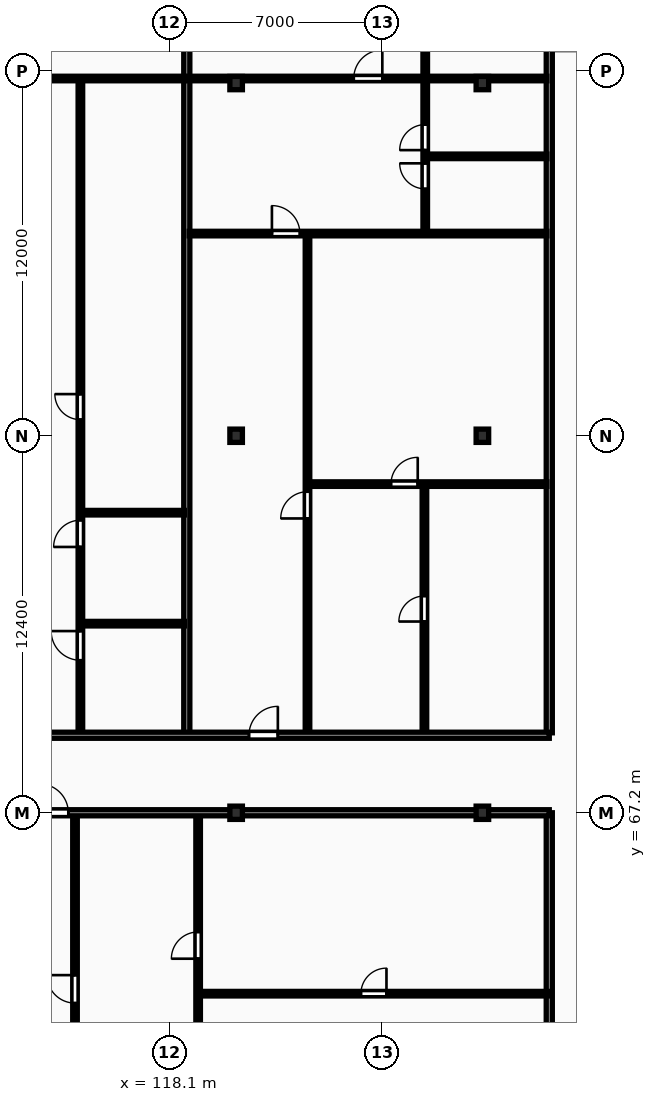
"""IFC4 building model, lengths in metres.
Left out: names, types, materials, properties, quantities, classifications, styles, units other than length and angle.
Written with IfcOpenShell. Run it as: python <this file> out.ifc"""

import sys

from ifc_helpers import new_model, si_unit, direction, frame, frame_2d, origin, origin_2d, place, context, subcontext, project, spatial, rectangle, i_section, extrude, element, fill, save


model = new_model("IFC4")
c1 = context("Model", 3, precision=1e-05, world=origin(), true_north=direction((0.0, 1.0)))
c2 = subcontext(c1, "Body", "Model", "MODEL_VIEW")
j1 = project(units=[si_unit("LENGTHUNIT", "METRE"), si_unit("PLANEANGLEUNIT", "RADIAN")], contexts=[c1])
p1 = place(None, origin())
s1 = spatial("IfcSite", under=j1, at=p1, CompositionType="ELEMENT")
p2 = place(p1, origin())
s2 = spatial("IfcBuilding", under=s1, at=p2, CompositionType="ELEMENT")
p3 = place(p2, frame((0.0, 0.0, 150.1)))
s3 = spatial("IfcBuildingStorey", under=s2, at=p3, CompositionType="ELEMENT", Elevation=150.1)
for number, where, z_axis, x_axis in (
    (1, (120.3, 67.2, 0.0), (0.0, 0.0, 1.0), (1.0, 0.0, 0.0)),
    (2, (120.3, 79.6, 0.0), (0.0, 0.0, 1.0), (1.0, 0.0, 0.0)),
    (3, (120.3, 91.2, 0.0), (0.0, 0.0, 1.0), (1.0, 0.0, 0.0)),
    (4, (128.4, 67.2, 0.0), (0.0, 0.0, 1.0), (1.0, 0.0, 0.0)),
    (5, (128.4, 79.6, 0.0), (0.0, 0.0, 1.0), (1.0, 0.0, 0.0)),
    (6, (128.4, 91.2, 0.0), (0.0, 0.0, 1.0), (1.0, 0.0, 0.0)),
):
    element("IfcColumn", number, at=place(p3, frame(where, z_axis=z_axis, x_axis=x_axis)), inside=s3, PredefinedType="COLUMN", context=c2, shape_type="SweptSolid", body=[
        extrude(i_section(OverallWidth=0.412, OverallDepth=0.437, WebThickness=0.036, FlangeThickness=0.052, FilletRadius=0.015, at=origin_2d()), origin(), (0.0, 0.0, 1.0), 3.6),
    ])
p4 = place(p3, frame((130.6, 51.1, 0.0), z_axis=(0.0, 0.0, 1.0), x_axis=(0.0, 1.0, 0.0)))
e7 = element("IfcWall", 7, at=p4, inside=s3, PredefinedType="PARTITIONING", context=c2, shape_type="SweptSolid", body=[
    extrude(rectangle(XDim=16.1, YDim=0.2, at=frame_2d((8.05, 0.0))), origin(), (0.0, 0.0, 1.0), 3.31),
])
p5 = place(p3, frame((119.05, 61.25, 0.0), z_axis=(0.0, 0.0, 1.0), x_axis=(1.0, 0.0, 0.0)))
e8 = element("IfcWall", 8, at=p5, inside=s3, PredefinedType="PARTITIONING", context=c2, shape_type="SweptSolid", body=[
    extrude(rectangle(XDim=11.55, YDim=0.15, at=frame_2d((5.775, 0.0))), origin(), (0.0, 0.0, 1.0), 3.31),
])
p6 = place(p5, frame((5.355, 0.0, 0.0)))
e9 = element("IfcOpeningElement", 9, at=p6, cuts=e8, PredefinedType="OPENING", context=c2, shape_type="SweptSolid", body=[
    extrude(rectangle(XDim=0.84, YDim=2.04, at=frame_2d((0.42, 1.02))), frame((0.0, 0.085, 0.0), z_axis=(0.0, -1.0, 0.0), x_axis=(1.0, 0.0, 0.0)), (0.0, 0.0, 1.0), 0.17),
])
p7 = place(p3, frame((119.05, 51.1, 0.0), z_axis=(0.0, 0.0, 1.0), x_axis=(0.0, 1.0, 0.0)))
e10 = element("IfcWall", 10, at=p7, inside=s3, PredefinedType="PARTITIONING", context=c2, shape_type="SweptSolid", body=[
    extrude(rectangle(XDim=16.05, YDim=0.15, at=frame_2d((8.025, 0.0))), origin(), (0.0, 0.0, 1.0), 3.31),
])
p8 = place(p7, frame((11.3, 0.0, 0.0)))
e11 = element("IfcOpeningElement", 11, at=p8, cuts=e10, PredefinedType="OPENING", context=c2, shape_type="SweptSolid", body=[
    extrude(rectangle(XDim=0.88, YDim=2.06, at=frame_2d((0.44, 1.03))), frame((0.0, 0.085, 0.0), z_axis=(0.0, -1.0, 0.0), x_axis=(1.0, 0.0, 0.0)), (0.0, 0.0, 1.0), 0.17),
])
p9 = place(p3, frame((115.0, 55.65, 0.0), z_axis=(0.0, 0.0, 1.0), x_axis=(0.0, 1.0, 0.0)))
e12 = element("IfcWall", 12, at=p9, inside=s3, PredefinedType="PARTITIONING", context=c2, shape_type="SweptSolid", body=[
    extrude(rectangle(XDim=11.5, YDim=0.15, at=frame_2d((5.75, 0.0))), origin(), (0.0, 0.0, 1.0), 3.31),
])
p10 = place(p9, frame((5.29, 0.0, 0.0)))
e13 = element("IfcOpeningElement", 13, at=p10, cuts=e12, PredefinedType="OPENING", context=c2, shape_type="SweptSolid", body=[
    extrude(rectangle(XDim=0.92, YDim=2.08, at=frame_2d((0.46, 1.04))), frame((0.0, 0.085, 0.0), z_axis=(0.0, -1.0, 0.0), x_axis=(1.0, 0.0, 0.0)), (0.0, 0.0, 1.0), 0.17),
])
p11 = place(p3, frame((112.25, 67.2, 0.0), z_axis=(0.0, 0.0, 1.0), x_axis=(1.0, 0.0, 0.0)))
e14 = element("IfcWall", 14, at=p11, inside=s3, PredefinedType="PARTITIONING", context=c2, shape_type="SweptSolid", body=[
    extrude(rectangle(XDim=18.35, YDim=0.2, at=frame_2d((9.175, 0.0))), origin(), (0.0, 0.0, 1.0), 2.773),
])
p12 = place(p11, frame((1.58, 0.0, 0.0)))
e15 = element("IfcOpeningElement", 15, at=p12, cuts=e14, PredefinedType="OPENING", context=c2, shape_type="SweptSolid", body=[
    extrude(rectangle(XDim=0.95, YDim=2.15, at=frame_2d((0.475, 1.075))), frame((0.0, 0.11, 0.0), z_axis=(0.0, -1.0, 0.0), x_axis=(1.0, 0.0, 0.0)), (0.0, 0.0, 1.0), 0.22),
])
for number, where, z_axis, x_axis in (
    (16, (130.6, 69.83, 0.0), (0.0, 0.0, 1.0), (0.0, 1.0, 0.0)),
    (17, (118.677, 69.83, 0.0), (0.0, 0.0, 1.0), (0.0, 1.0, 0.0)),
):
    element("IfcWall", number, at=place(p3, frame(where, z_axis=z_axis, x_axis=x_axis)), inside=s3, PredefinedType="PARTITIONING", context=c2, shape_type="SweptSolid", body=[
        extrude(rectangle(XDim=26.07, YDim=0.2, at=frame_2d((13.035, 0.0))), origin(), (0.0, 0.0, 1.0), 3.31),
    ])
for number, where, z_axis, x_axis in (
    (18, (115.237, 73.42, 0.0), (0.0, 0.0, 1.0), (1.0, 0.0, 0.0)),
    (19, (115.237, 77.07, 0.0), (0.0, 0.0, 1.0), (1.0, 0.0, 0.0)),
):
    element("IfcWall", number, at=place(p3, frame(where, z_axis=z_axis, x_axis=x_axis)), inside=s3, PredefinedType="PARTITIONING", context=c2, shape_type="SweptSolid", body=[
        extrude(rectangle(XDim=3.36, YDim=0.15, at=frame_2d((1.68, 0.0))), origin(), (0.0, 0.0, 1.0), 3.31),
    ])
p13 = place(p3, frame((115.177, 69.81, 0.0), z_axis=(0.0, 0.0, 1.0), x_axis=(0.0, 1.0, 0.0)))
e20 = element("IfcWall", 20, at=p13, inside=s3, PredefinedType="PARTITIONING", context=c2, shape_type="SweptSolid", body=[
    extrude(rectangle(XDim=21.48, YDim=0.15, at=frame_2d((10.74, 0.0))), origin(), (0.0, 0.0, 1.0), 3.31),
])
p14 = place(p13, frame((2.406, 0.0, 0.0)))
e21 = element("IfcOpeningElement", 21, at=p14, cuts=e20, PredefinedType="OPENING", context=c2, shape_type="SweptSolid", body=[
    extrude(rectangle(XDim=0.96, YDim=2.1, at=frame_2d((0.48, 1.05))), frame((0.0, 0.085, 0.0), z_axis=(0.0, -1.0, 0.0), x_axis=(1.0, 0.0, 0.0)), (0.0, 0.0, 1.0), 0.17),
])
p15 = place(p13, frame((6.133, 0.0, 0.0)))
e22 = element("IfcOpeningElement", 22, at=p15, cuts=e20, PredefinedType="OPENING", context=c2, shape_type="SweptSolid", body=[
    extrude(rectangle(XDim=0.88, YDim=2.06, at=frame_2d((0.44, 1.03))), frame((0.0, 0.085, 0.0), z_axis=(0.0, -1.0, 0.0), x_axis=(1.0, 0.0, 0.0)), (0.0, 0.0, 1.0), 0.17),
])
p16 = place(p13, frame((10.32, 0.0, 0.0)))
e23 = element("IfcOpeningElement", 23, at=p16, cuts=e20, PredefinedType="OPENING", context=c2, shape_type="SweptSolid", body=[
    extrude(rectangle(XDim=0.84, YDim=2.04, at=frame_2d((0.42, 1.02))), frame((0.0, 0.085, 0.0), z_axis=(0.0, -1.0, 0.0), x_axis=(1.0, 0.0, 0.0)), (0.0, 0.0, 1.0), 0.17),
])
p17 = place(p3, frame((98.896, 91.35, 0.0), z_axis=(0.0, 0.0, 1.0), x_axis=(1.0, 0.0, 0.0)))
e24 = element("IfcWall", 24, at=p17, inside=s3, PredefinedType="PARTITIONING", context=c2, shape_type="SweptSolid", body=[
    extrude(rectangle(XDim=19.701, YDim=0.15, at=frame_2d((9.851, 0.0))), origin(), (0.0, 0.0, 1.0), 3.003),
])
p18 = place(p17, frame((7.24, 0.0, 0.0)))
e25 = element("IfcOpeningElement", 25, at=p18, cuts=e24, PredefinedType="OPENING", context=c2, shape_type="SweptSolid", body=[
    extrude(rectangle(XDim=0.94, YDim=2.1, at=frame_2d((0.47, 1.05))), frame((0.0, 0.085, 0.0), z_axis=(0.0, -1.0, 0.0), x_axis=(1.0, 0.0, 0.0)), (0.0, 0.0, 1.0), 0.17),
])
p19 = place(p17, frame((9.381, 0.0, 0.0)))
e26 = element("IfcOpeningElement", 26, at=p19, cuts=e24, PredefinedType="OPENING", context=c2, shape_type="SweptSolid", body=[
    extrude(rectangle(XDim=0.94, YDim=2.1, at=frame_2d((0.47, 1.05))), frame((0.0, 0.085, 0.0), z_axis=(0.0, -1.0, 0.0), x_axis=(1.0, 0.0, 0.0)), (0.0, 0.0, 1.0), 0.17),
])
p20 = place(p3, frame((126.494, 69.81, 0.0), z_axis=(0.0, 0.0, 1.0), x_axis=(0.0, 1.0, 0.0)))
e27 = element("IfcWall", 27, at=p20, inside=s3, PredefinedType="PARTITIONING", context=c2, shape_type="SweptSolid", body=[
    extrude(rectangle(XDim=8.2, YDim=0.15, at=frame_2d((4.1, 0.0))), origin(), (0.0, 0.0, 1.0), 3.31),
])
p21 = place(p20, frame((3.68, 0.0, 0.0)))
e28 = element("IfcOpeningElement", 28, at=p21, cuts=e27, PredefinedType="OPENING", context=c2, shape_type="SweptSolid", body=[
    extrude(rectangle(XDim=0.84, YDim=2.04, at=frame_2d((0.42, 1.02))), frame((0.0, 0.085, 0.0), z_axis=(0.0, -1.0, 0.0), x_axis=(1.0, 0.0, 0.0)), (0.0, 0.0, 1.0), 0.17),
])
p22 = place(p3, frame((122.707, 78.01, 0.0), z_axis=(0.0, 0.0, 1.0), x_axis=(1.0, 0.0, 0.0)))
e29 = element("IfcWall", 29, at=p22, inside=s3, PredefinedType="PARTITIONING", context=c2, shape_type="SweptSolid", body=[
    extrude(rectangle(XDim=7.813, YDim=0.15, at=frame_2d((3.906, 0.0))), origin(), (0.0, 0.0, 1.0), 3.31),
])
p23 = place(p22, frame((2.686, 0.0, 0.0)))
e30 = element("IfcOpeningElement", 30, at=p23, cuts=e29, PredefinedType="OPENING", context=c2, shape_type="SweptSolid", body=[
    extrude(rectangle(XDim=0.88, YDim=2.06, at=frame_2d((0.44, 1.03))), frame((0.0, 0.085, 0.0), z_axis=(0.0, -1.0, 0.0), x_axis=(1.0, 0.0, 0.0)), (0.0, 0.0, 1.0), 0.17),
])
p24 = place(p3, frame((122.647, 69.81, 0.0), z_axis=(0.0, 0.0, 1.0), x_axis=(0.0, 1.0, 0.0)))
e31 = element("IfcWall", 31, at=p24, inside=s3, PredefinedType="PARTITIONING", context=c2, shape_type="SweptSolid", body=[
    extrude(rectangle(XDim=16.4, YDim=0.15, at=frame_2d((8.2, 0.0))), origin(), (0.0, 0.0, 1.0), 3.31),
])
p25 = place(p24, frame((7.07, 0.0, 0.0)))
e32 = element("IfcOpeningElement", 32, at=p25, cuts=e31, PredefinedType="OPENING", context=c2, shape_type="SweptSolid", body=[
    extrude(rectangle(XDim=0.88, YDim=2.06, at=frame_2d((0.44, 1.03))), frame((0.0, 0.085, 0.0), z_axis=(0.0, -1.0, 0.0), x_axis=(1.0, 0.0, 0.0)), (0.0, 0.0, 1.0), 0.17),
])
p26 = place(p3, frame((126.58, 88.79, 0.0), z_axis=(0.0, 0.0, 1.0), x_axis=(1.0, 0.0, 0.0)))
e33 = element("IfcWall", 33, at=p26, inside=s3, PredefinedType="PARTITIONING", context=c2, shape_type="SweptSolid", body=[
    extrude(rectangle(XDim=3.94, YDim=0.15, at=frame_2d((1.97, 0.0))), origin(), (0.0, 0.0, 1.0), 3.31),
])
p27 = place(p3, frame((126.52, 86.29, 0.0), z_axis=(0.0, 0.0, 1.0), x_axis=(0.0, 1.0, 0.0)))
e34 = element("IfcWall", 34, at=p27, inside=s3, PredefinedType="PARTITIONING", context=c2, shape_type="SweptSolid", body=[
    extrude(rectangle(XDim=9.61, YDim=0.15, at=frame_2d((4.805, 0.0))), origin(), (0.0, 0.0, 1.0), 3.31),
])
p28 = place(p27, frame((1.43, 0.0, 0.0)))
e35 = element("IfcOpeningElement", 35, at=p28, cuts=e34, PredefinedType="OPENING", context=c2, shape_type="SweptSolid", body=[
    extrude(rectangle(XDim=0.84, YDim=2.04, at=frame_2d((0.42, 1.02))), frame((0.0, 0.085, 0.0), z_axis=(0.0, -1.0, 0.0), x_axis=(1.0, 0.0, 0.0)), (0.0, 0.0, 1.0), 0.17),
])
p29 = place(p27, frame((2.705, 0.0, 0.0)))
e36 = element("IfcOpeningElement", 36, at=p29, cuts=e34, PredefinedType="OPENING", context=c2, shape_type="SweptSolid", body=[
    extrude(rectangle(XDim=0.84, YDim=2.04, at=frame_2d((0.42, 1.02))), frame((0.0, 0.085, 0.0), z_axis=(0.0, -1.0, 0.0), x_axis=(1.0, 0.0, 0.0)), (0.0, 0.0, 1.0), 0.17),
])
p30 = place(p27, frame((6.314, 0.0, 0.0)))
e37 = element("IfcOpeningElement", 37, at=p30, cuts=e34, PredefinedType="OPENING", context=c2, shape_type="SweptSolid", body=[
    extrude(rectangle(XDim=0.88, YDim=2.06, at=frame_2d((0.44, 1.03))), frame((0.0, 0.085, 0.0), z_axis=(0.0, -1.0, 0.0), x_axis=(1.0, 0.0, 0.0)), (0.0, 0.0, 1.0), 0.17),
])
p31 = place(p3, frame((118.757, 86.25, 0.0), z_axis=(0.0, 0.0, 1.0), x_axis=(1.0, 0.0, 0.0)))
e38 = element("IfcWall", 38, at=p31, inside=s3, PredefinedType="PARTITIONING", context=c2, shape_type="SweptSolid", body=[
    extrude(rectangle(XDim=11.763, YDim=0.15, at=frame_2d((5.881, 0.0))), origin(), (0.0, 0.0, 1.0), 3.31),
])
p32 = place(p31, frame((2.72, 0.0, 0.0)))
e39 = element("IfcOpeningElement", 39, at=p32, cuts=e38, PredefinedType="OPENING", context=c2, shape_type="SweptSolid", body=[
    extrude(rectangle(XDim=0.92, YDim=2.08, at=frame_2d((0.46, 1.04))), frame((0.0, 0.085, 0.0), z_axis=(0.0, -1.0, 0.0), x_axis=(1.0, 0.0, 0.0)), (0.0, 0.0, 1.0), 0.17),
])
p33 = place(p3, frame((118.757, 91.35, 0.0), z_axis=(0.0, 0.0, 1.0), x_axis=(1.0, 0.0, 0.0)))
e40 = element("IfcWall", 40, at=p33, inside=s3, PredefinedType="PARTITIONING", context=c2, shape_type="SweptSolid", body=[
    extrude(rectangle(XDim=11.763, YDim=0.15, at=frame_2d((5.881, 0.0))), origin(), (0.0, 0.0, 1.0), 3.003),
])
p34 = place(p33, frame((5.411, 0.0, 0.0)))
e41 = element("IfcOpeningElement", 41, at=p34, cuts=e40, PredefinedType="OPENING", context=c2, shape_type="SweptSolid", body=[
    extrude(rectangle(XDim=0.94, YDim=2.1, at=frame_2d((0.47, 1.05))), frame((0.0, 0.085, 0.0), z_axis=(0.0, -1.0, 0.0), x_axis=(1.0, 0.0, 0.0)), (0.0, 0.0, 1.0), 0.17),
])
p35 = place(p3, frame((57.6, 69.75, 0.0), z_axis=(0.0, 0.0, 1.0), x_axis=(1.0, 0.0, 0.0)))
e42 = element("IfcWall", 42, at=p35, inside=s3, PredefinedType="PARTITIONING", context=c2, shape_type="SweptSolid", body=[
    extrude(rectangle(XDim=73.0, YDim=0.2, at=frame_2d((36.5, 0.0))), origin(), (0.0, 0.0, 1.0), 3.31),
])
p36 = place(p35, frame((9.189, 0.0, 0.0)))
e43 = element("IfcOpeningElement", 43, at=p36, cuts=e42, PredefinedType="OPENING", context=c2, shape_type="SweptSolid", body=[
    extrude(rectangle(XDim=1.22, YDim=2.18, at=frame_2d((0.61, 1.09))), frame((0.0, 0.11, 0.0), z_axis=(0.0, -1.0, 0.0), x_axis=(1.0, 0.0, 0.0)), (0.0, 0.0, 1.0), 0.22),
])
p37 = place(p35, frame((29.912, 0.0, 0.0)))
e44 = element("IfcOpeningElement", 44, at=p37, cuts=e42, PredefinedType="OPENING", context=c2, shape_type="SweptSolid", body=[
    extrude(rectangle(XDim=1.22, YDim=2.18, at=frame_2d((0.61, 1.09))), frame((0.0, 0.11, 0.0), z_axis=(0.0, -1.0, 0.0), x_axis=(1.0, 0.0, 0.0)), (0.0, 0.0, 1.0), 0.22),
])
p38 = place(p35, frame((49.457, 0.0, 0.0)))
e45 = element("IfcOpeningElement", 45, at=p38, cuts=e42, PredefinedType="OPENING", context=c2, shape_type="SweptSolid", body=[
    extrude(rectangle(XDim=1.22, YDim=2.18, at=frame_2d((0.61, 1.09))), frame((0.0, 0.11, 0.0), z_axis=(0.0, -1.0, 0.0), x_axis=(1.0, 0.0, 0.0)), (0.0, 0.0, 1.0), 0.22),
])
p39 = place(p35, frame((63.122, 0.0, 0.0)))
e46 = element("IfcOpeningElement", 46, at=p39, cuts=e42, PredefinedType="OPENING", context=c2, shape_type="SweptSolid", body=[
    extrude(rectangle(XDim=0.95, YDim=2.15, at=frame_2d((0.475, 1.075))), frame((0.0, 0.11, 0.0), z_axis=(0.0, -1.0, 0.0), x_axis=(1.0, 0.0, 0.0)), (0.0, 0.0, 1.0), 0.22),
])
p40 = place(p6, origin())
e47 = element("IfcDoor", 47, at=p40, inside=s3, OperationType="SINGLE_SWING_RIGHT", PredefinedType="DOOR", context=c2, shape_type="SweptSolid", body=[
    extrude(rectangle(XDim=0.84, YDim=2.04, at=frame_2d((0.42, 1.02))), frame((0.0, 0.025, 0.0), z_axis=(0.0, -1.0, 0.0), x_axis=(1.0, 0.0, 0.0)), (0.0, 0.0, 1.0), 0.05),
])
fill(e9, e47)
p41 = place(p8, origin())
e48 = element("IfcDoor", 48, at=p41, inside=s3, OperationType="SINGLE_SWING_LEFT", PredefinedType="DOOR", context=c2, shape_type="SweptSolid", body=[
    extrude(rectangle(XDim=0.88, YDim=2.06, at=frame_2d((0.44, 1.03))), frame((0.0, 0.025, 0.0), z_axis=(0.0, -1.0, 0.0), x_axis=(1.0, 0.0, 0.0)), (0.0, 0.0, 1.0), 0.05),
])
fill(e11, e48)
p42 = place(p10, origin())
e49 = element("IfcDoor", 49, at=p42, inside=s3, OperationType="SINGLE_SWING_RIGHT", PredefinedType="DOOR", context=c2, shape_type="SweptSolid", body=[
    extrude(rectangle(XDim=0.92, YDim=2.08, at=frame_2d((0.46, 1.04))), frame((0.0, 0.025, 0.0), z_axis=(0.0, -1.0, 0.0), x_axis=(1.0, 0.0, 0.0)), (0.0, 0.0, 1.0), 0.05),
])
fill(e13, e49)
p43 = place(p12, origin())
e50 = element("IfcDoor", 50, at=p43, inside=s3, OperationType="SINGLE_SWING_LEFT", PredefinedType="DOOR", context=c2, shape_type="SweptSolid", body=[
    extrude(rectangle(XDim=0.95, YDim=2.15, at=frame_2d((0.475, 1.075))), frame((0.0, 0.025, 0.0), z_axis=(0.0, -1.0, 0.0), x_axis=(1.0, 0.0, 0.0)), (0.0, 0.0, 1.0), 0.05),
])
fill(e15, e50)
p44 = place(p14, origin())
e51 = element("IfcDoor", 51, at=p44, inside=s3, OperationType="SINGLE_SWING_RIGHT", PredefinedType="DOOR", context=c2, shape_type="SweptSolid", body=[
    extrude(rectangle(XDim=0.96, YDim=2.1, at=frame_2d((0.48, 1.05))), frame((0.0, 0.025, 0.0), z_axis=(0.0, -1.0, 0.0), x_axis=(1.0, 0.0, 0.0)), (0.0, 0.0, 1.0), 0.05),
])
fill(e21, e51)
p45 = place(p15, origin())
e52 = element("IfcDoor", 52, at=p45, inside=s3, OperationType="SINGLE_SWING_LEFT", PredefinedType="DOOR", context=c2, shape_type="SweptSolid", body=[
    extrude(rectangle(XDim=0.88, YDim=2.06, at=frame_2d((0.44, 1.03))), frame((0.0, 0.025, 0.0), z_axis=(0.0, -1.0, 0.0), x_axis=(1.0, 0.0, 0.0)), (0.0, 0.0, 1.0), 0.05),
])
fill(e22, e52)
p46 = place(p16, origin())
e53 = element("IfcDoor", 53, at=p46, inside=s3, OperationType="SINGLE_SWING_RIGHT", PredefinedType="DOOR", context=c2, shape_type="SweptSolid", body=[
    extrude(rectangle(XDim=0.84, YDim=2.04, at=frame_2d((0.42, 1.02))), frame((0.0, 0.025, 0.0), z_axis=(0.0, -1.0, 0.0), x_axis=(1.0, 0.0, 0.0)), (0.0, 0.0, 1.0), 0.05),
])
fill(e23, e53)
p47 = place(p21, origin())
e54 = element("IfcDoor", 54, at=p47, inside=s3, OperationType="SINGLE_SWING_LEFT", PredefinedType="DOOR", context=c2, shape_type="SweptSolid", body=[
    extrude(rectangle(XDim=0.84, YDim=2.04, at=frame_2d((0.42, 1.02))), frame((0.0, 0.025, 0.0), z_axis=(0.0, -1.0, 0.0), x_axis=(1.0, 0.0, 0.0)), (0.0, 0.0, 1.0), 0.05),
])
fill(e28, e54)
p48 = place(p23, origin())
e55 = element("IfcDoor", 55, at=p48, inside=s3, OperationType="SINGLE_SWING_RIGHT", PredefinedType="DOOR", context=c2, shape_type="SweptSolid", body=[
    extrude(rectangle(XDim=0.88, YDim=2.06, at=frame_2d((0.44, 1.03))), frame((0.0, 0.025, 0.0), z_axis=(0.0, -1.0, 0.0), x_axis=(1.0, 0.0, 0.0)), (0.0, 0.0, 1.0), 0.05),
])
fill(e30, e55)
p49 = place(p25, origin())
e56 = element("IfcDoor", 56, at=p49, inside=s3, OperationType="SINGLE_SWING_LEFT", PredefinedType="DOOR", context=c2, shape_type="SweptSolid", body=[
    extrude(rectangle(XDim=0.88, YDim=2.06, at=frame_2d((0.44, 1.03))), frame((0.0, 0.025, 0.0), z_axis=(0.0, -1.0, 0.0), x_axis=(1.0, 0.0, 0.0)), (0.0, 0.0, 1.0), 0.05),
])
fill(e32, e56)
p50 = place(p28, origin())
e57 = element("IfcDoor", 57, at=p50, inside=s3, OperationType="SINGLE_SWING_RIGHT", PredefinedType="DOOR", context=c2, shape_type="SweptSolid", body=[
    extrude(rectangle(XDim=0.84, YDim=2.04, at=frame_2d((0.42, 1.02))), frame((0.0, 0.025, 0.0), z_axis=(0.0, -1.0, 0.0), x_axis=(1.0, 0.0, 0.0)), (0.0, 0.0, 1.0), 0.05),
])
fill(e35, e57)
p51 = place(p29, origin())
e58 = element("IfcDoor", 58, at=p51, inside=s3, OperationType="SINGLE_SWING_LEFT", PredefinedType="DOOR", context=c2, shape_type="SweptSolid", body=[
    extrude(rectangle(XDim=0.84, YDim=2.04, at=frame_2d((0.42, 1.02))), frame((0.0, 0.025, 0.0), z_axis=(0.0, -1.0, 0.0), x_axis=(1.0, 0.0, 0.0)), (0.0, 0.0, 1.0), 0.05),
])
fill(e36, e58)
p52 = place(p32, origin())
e59 = element("IfcDoor", 59, at=p52, inside=s3, OperationType="SINGLE_SWING_LEFT", PredefinedType="DOOR", context=c2, shape_type="SweptSolid", body=[
    extrude(rectangle(XDim=0.92, YDim=2.08, at=frame_2d((0.46, 1.04))), frame((0.0, 0.025, 0.0), z_axis=(0.0, -1.0, 0.0), x_axis=(1.0, 0.0, 0.0)), (0.0, 0.0, 1.0), 0.05),
])
fill(e39, e59)
p53 = place(p34, origin())
e60 = element("IfcDoor", 60, at=p53, inside=s3, OperationType="SINGLE_SWING_RIGHT", PredefinedType="DOOR", context=c2, shape_type="SweptSolid", body=[
    extrude(rectangle(XDim=0.94, YDim=2.1, at=frame_2d((0.47, 1.05))), frame((0.0, 0.025, 0.0), z_axis=(0.0, -1.0, 0.0), x_axis=(1.0, 0.0, 0.0)), (0.0, 0.0, 1.0), 0.05),
])
fill(e41, e60)
p54 = place(p39, origin())
e61 = element("IfcDoor", 61, at=p54, inside=s3, OperationType="SINGLE_SWING_RIGHT", PredefinedType="DOOR", context=c2, shape_type="SweptSolid", body=[
    extrude(rectangle(XDim=0.95, YDim=2.15, at=frame_2d((0.475, 1.075))), frame((0.0, 0.025, 0.0), z_axis=(0.0, -1.0, 0.0), x_axis=(1.0, 0.0, 0.0)), (0.0, 0.0, 1.0), 0.05),
])
fill(e46, e61)
save(model, sys.argv[1])
